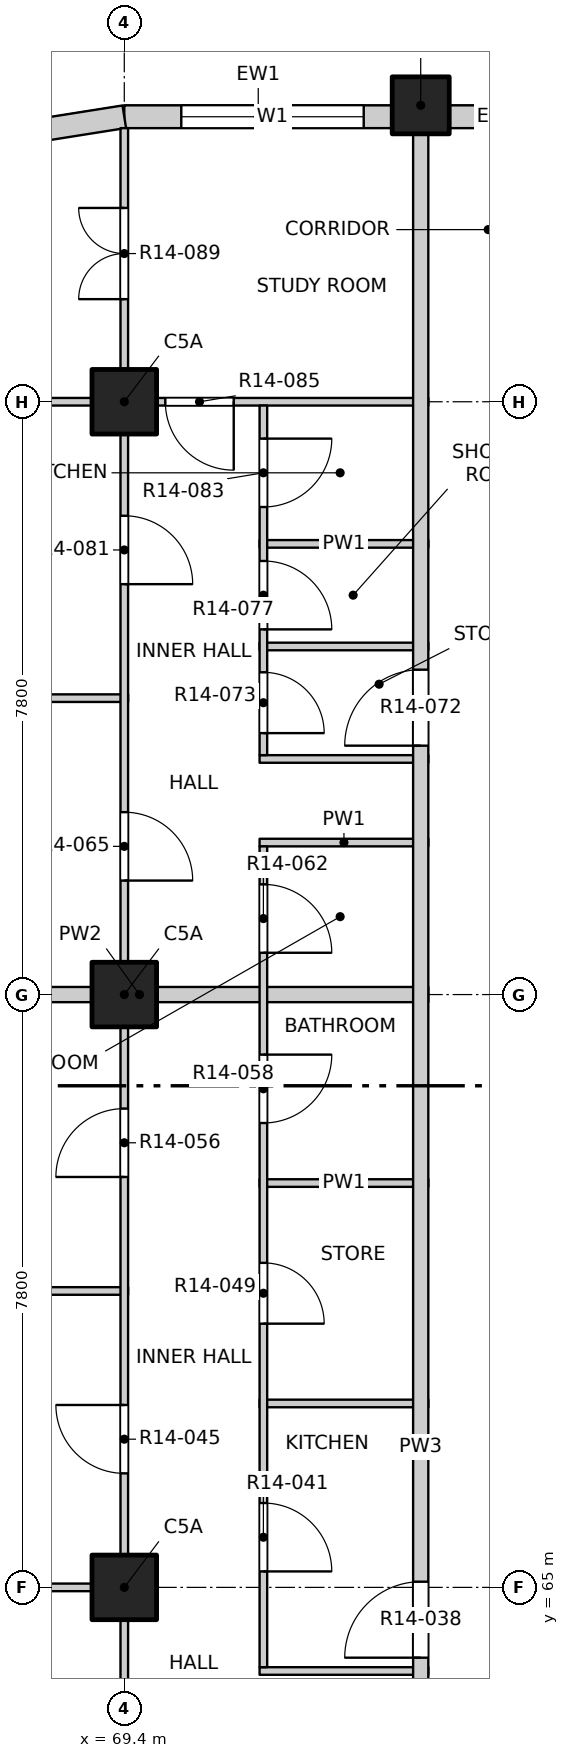
"""IFC4 building model, lengths in metres.
Left out: names, types, materials, properties, quantities, classifications, styles, units other than length and angle.
Written with IfcOpenShell. Run it as: python <this file> out.ifc"""

import sys

from ifc_helpers import new_model, si_unit, direction, frame, frame_2d, origin, origin_2d, place, context, subcontext, project, spatial, rectangle, extrude, element, fill, save


model = new_model("IFC4")
c1 = context("Model", 3, precision=1e-05, world=origin(), true_north=direction((0.0, 1.0)))
c2 = subcontext(c1, "Body", "Model", "MODEL_VIEW")
j1 = project(units=[si_unit("LENGTHUNIT", "METRE"), si_unit("PLANEANGLEUNIT", "RADIAN")], contexts=[c1])
p1 = place(None, origin())
s1 = spatial("IfcSite", under=j1, at=p1, CompositionType="ELEMENT")
p2 = place(p1, origin())
s2 = spatial("IfcBuilding", under=s1, at=p2, CompositionType="ELEMENT")
p3 = place(p2, frame((0.0, 0.0, 148.6)))
s3 = spatial("IfcBuildingStorey", under=s2, at=p3, CompositionType="ELEMENT", Elevation=148.6)
p4 = place(p3, frame((73.3, 84.5, -0.3), z_axis=(0.0, 0.0, 1.0), x_axis=(1.0, 0.0, 0.0)))
e1 = element("IfcColumn", 1, at=p4, inside=s3, PredefinedType="COLUMN", context=c2, shape_type="SweptSolid", body=[
    extrude(rectangle(XDim=0.75, YDim=0.75, at=origin_2d()), origin(), (0.0, 0.0, 1.0), 3.45),
])
for number, where, z_axis, x_axis in (
    (2, (69.4, 65.0, -0.3), (0.0, 0.0, 1.0), (1.0, 0.0, 0.0)),
    (3, (69.4, 72.8, -0.3), (0.0, 0.0, 1.0), (1.0, 0.0, 0.0)),
    (4, (69.4, 80.6, -0.3), (0.0, 0.0, 1.0), (1.0, 0.0, 0.0)),
):
    element("IfcColumn", number, at=place(p3, frame(where, z_axis=z_axis, x_axis=x_axis)), inside=s3, PredefinedType="COLUMN", context=c2, shape_type="SweptSolid", body=[
        extrude(rectangle(XDim=0.85, YDim=0.85, at=origin_2d()), origin(), (0.0, 0.0, 1.0), 3.45),
    ])
p5 = place(p3, frame((69.4, 84.35, 0.0), z_axis=(0.0, 0.0, 1.0), x_axis=(1.0, 0.0, 0.0)))
e5 = element("IfcWall", 5, at=p5, inside=s3, PredefinedType="SOLIDWALL", context=c2, shape_type="SweptSolid", body=[
    extrude(rectangle(XDim=3.525, YDim=0.3, at=frame_2d((1.763, 0.0))), origin(), (0.0, 0.0, 1.0), 2.7),
])
p6 = place(p5, frame((0.75, 0.0, 0.9)))
e6 = element("IfcOpeningElement", 6, at=p6, cuts=e5, PredefinedType="OPENING", context=c2, shape_type="SweptSolid", body=[
    extrude(rectangle(XDim=2.4, YDim=1.8, at=frame_2d((1.2, 0.9))), frame((0.0, 0.16, 0.0), z_axis=(0.0, -1.0, 0.0), x_axis=(1.0, 0.0, 0.0)), (0.0, 0.0, 1.0), 0.32),
])
p7 = place(p3, frame((73.675, 84.35, 0.0), z_axis=(0.0, 0.0, 1.0), x_axis=(1.0, 0.0, 0.0)))
e7 = element("IfcWall", 7, at=p7, inside=s3, PredefinedType="SOLIDWALL", context=c2, shape_type="SweptSolid", body=[
    extrude(rectangle(XDim=1.3, YDim=0.3, at=frame_2d((0.65, 0.0))), origin(), (0.0, 0.0, 1.0), 2.7),
])
p8 = place(p3, frame((69.4, 84.35, 0.0), z_axis=(0.0, 0.0, 1.0), x_axis=(-0.987678452879, -0.156496880861, 0.0)))
e8 = element("IfcWall", 8, at=p8, inside=s3, PredefinedType="SOLIDWALL", context=c2, shape_type="SweptSolid", body=[
    extrude(rectangle(XDim=1.173, YDim=0.3, at=frame_2d((0.586, 0.0))), origin(), (0.0, 0.0, 1.0), 2.7),
])
p9 = place(p3, frame((71.18, 63.9, 0.0), z_axis=(0.0, 0.0, 1.0), x_axis=(1.0, 0.0, 0.0)))
e9 = element("IfcWall", 9, at=p9, inside=s3, PredefinedType="PARTITIONING", context=c2, shape_type="SweptSolid", body=[
    extrude(rectangle(XDim=2.22, YDim=0.1, at=frame_2d((1.11, 0.0))), origin(), (0.0, 0.0, 1.0), 3.15),
])
p10 = place(p3, frame((65.8, 65.0, 0.0), z_axis=(0.0, 0.0, 1.0), x_axis=(1.0, 0.0, 0.0)))
e10 = element("IfcWall", 10, at=p10, inside=s3, PredefinedType="PARTITIONING", context=c2, shape_type="SweptSolid", body=[
    extrude(rectangle(XDim=3.65, YDim=0.1, at=frame_2d((1.825, 0.0))), origin(), (0.0, 0.0, 1.0), 3.15),
])
p11 = place(p3, frame((71.18, 67.42, 0.0), z_axis=(0.0, 0.0, 1.0), x_axis=(1.0, 0.0, 0.0)))
e11 = element("IfcWall", 11, at=p11, inside=s3, PredefinedType="PARTITIONING", context=c2, shape_type="SweptSolid", body=[
    extrude(rectangle(XDim=2.22, YDim=0.1, at=frame_2d((1.11, 0.0))), origin(), (0.0, 0.0, 1.0), 3.15),
])
p12 = place(p3, frame((65.8, 68.9, 0.0), z_axis=(0.0, 0.0, 1.0), x_axis=(1.0, 0.0, 0.0)))
e12 = element("IfcWall", 12, at=p12, inside=s3, PredefinedType="PARTITIONING", context=c2, shape_type="SweptSolid", body=[
    extrude(rectangle(XDim=3.65, YDim=0.1, at=frame_2d((1.825, 0.0))), origin(), (0.0, 0.0, 1.0), 2.55),
])
p13 = place(p3, frame((71.18, 70.32, 0.0), z_axis=(0.0, 0.0, 1.0), x_axis=(1.0, 0.0, 0.0)))
e13 = element("IfcWall", 13, at=p13, inside=s3, PredefinedType="PARTITIONING", context=c2, shape_type="SweptSolid", body=[
    extrude(rectangle(XDim=2.22, YDim=0.1, at=frame_2d((1.11, 0.0))), origin(), (0.0, 0.0, 1.0), 3.15),
])
p14 = place(p3, frame((65.8, 72.8, 0.0), z_axis=(0.0, 0.0, 1.0), x_axis=(1.0, 0.0, 0.0)))
e14 = element("IfcWall", 14, at=p14, inside=s3, PredefinedType="PARTITIONING", context=c2, shape_type="SweptSolid", body=[
    extrude(rectangle(XDim=7.6, YDim=0.2, at=frame_2d((3.8, 0.0))), origin(), (0.0, 0.0, 1.0), 3.15),
])
for number, where, z_axis, x_axis in (
    (15, (71.18, 74.8, 0.0), (0.0, 0.0, 1.0), (1.0, 0.0, 0.0)),
    (16, (71.18, 75.9, 0.0), (0.0, 0.0, 1.0), (1.0, 0.0, 0.0)),
):
    element("IfcWall", number, at=place(p3, frame(where, z_axis=z_axis, x_axis=x_axis)), inside=s3, PredefinedType="PARTITIONING", context=c2, shape_type="SweptSolid", body=[
        extrude(rectangle(XDim=2.22, YDim=0.1, at=frame_2d((1.11, 0.0))), origin(), (0.0, 0.0, 1.0), 3.15),
    ])
p15 = place(p3, frame((65.8, 76.7, 0.0), z_axis=(0.0, 0.0, 1.0), x_axis=(1.0, 0.0, 0.0)))
e17 = element("IfcWall", 17, at=p15, inside=s3, PredefinedType="PARTITIONING", context=c2, shape_type="SweptSolid", body=[
    extrude(rectangle(XDim=3.65, YDim=0.1, at=frame_2d((1.825, 0.0))), origin(), (0.0, 0.0, 1.0), 2.55),
])
for number, where, z_axis, x_axis in (
    (18, (71.18, 77.38, 0.0), (0.0, 0.0, 1.0), (1.0, 0.0, 0.0)),
    (19, (71.18, 78.73, 0.0), (0.0, 0.0, 1.0), (1.0, 0.0, 0.0)),
):
    element("IfcWall", number, at=place(p3, frame(where, z_axis=z_axis, x_axis=x_axis)), inside=s3, PredefinedType="PARTITIONING", context=c2, shape_type="SweptSolid", body=[
        extrude(rectangle(XDim=2.22, YDim=0.1, at=frame_2d((1.11, 0.0))), origin(), (0.0, 0.0, 1.0), 3.15),
    ])
p16 = place(p3, frame((65.8, 80.6, 0.0), z_axis=(0.0, 0.0, 1.0), x_axis=(1.0, 0.0, 0.0)))
e20 = element("IfcWall", 20, at=p16, inside=s3, PredefinedType="PARTITIONING", context=c2, shape_type="SweptSolid", body=[
    extrude(rectangle(XDim=7.6, YDim=0.1, at=frame_2d((3.8, 0.0))), origin(), (0.0, 0.0, 1.0), 3.15),
])
p17 = place(p16, frame((4.14, 0.0, 0.0)))
e21 = element("IfcOpeningElement", 21, at=p17, cuts=e20, PredefinedType="OPENING", context=c2, shape_type="SweptSolid", body=[
    extrude(rectangle(XDim=0.9, YDim=2.1, at=frame_2d((0.45, 1.05))), frame((0.0, 0.06, 0.0), z_axis=(0.0, -1.0, 0.0), x_axis=(1.0, 0.0, 0.0)), (0.0, 0.0, 1.0), 0.12),
])
p18 = place(p3, frame((69.4, 45.8, 0.0), z_axis=(0.0, 0.0, 1.0), x_axis=(0.0, 1.0, 0.0)))
e22 = element("IfcWall", 22, at=p18, inside=s3, PredefinedType="PARTITIONING", context=c2, shape_type="SweptSolid", body=[
    extrude(rectangle(XDim=38.4, YDim=0.1, at=frame_2d((19.2, 0.0))), origin(), (0.0, 0.0, 1.0), 3.15),
])
p19 = place(p18, frame((1.05, 0.0, 0.0)))
e23 = element("IfcOpeningElement", 23, at=p19, cuts=e22, PredefinedType="OPENING", context=c2, shape_type="SweptSolid", body=[
    extrude(rectangle(XDim=1.2, YDim=2.1, at=frame_2d((0.6, 1.05))), frame((0.0, 0.06, 0.0), z_axis=(0.0, -1.0, 0.0), x_axis=(1.0, 0.0, 0.0)), (0.0, 0.0, 1.0), 0.12),
])
p20 = place(p18, frame((6.9, 0.0, 0.0)))
e24 = element("IfcOpeningElement", 24, at=p20, cuts=e22, PredefinedType="OPENING", context=c2, shape_type="SweptSolid", body=[
    extrude(rectangle(XDim=1.2, YDim=2.1, at=frame_2d((0.6, 1.05))), frame((0.0, 0.06, 0.0), z_axis=(0.0, -1.0, 0.0), x_axis=(1.0, 0.0, 0.0)), (0.0, 0.0, 1.0), 0.12),
])
p21 = place(p18, frame((12.9, 0.0, 0.0)))
e25 = element("IfcOpeningElement", 25, at=p21, cuts=e22, PredefinedType="OPENING", context=c2, shape_type="SweptSolid", body=[
    extrude(rectangle(XDim=0.9, YDim=2.1, at=frame_2d((0.45, 1.05))), frame((0.0, 0.06, 0.0), z_axis=(0.0, -1.0, 0.0), x_axis=(1.0, 0.0, 0.0)), (0.0, 0.0, 1.0), 0.12),
])
p22 = place(p18, frame((16.8, 0.0, 0.0)))
e26 = element("IfcOpeningElement", 26, at=p22, cuts=e22, PredefinedType="OPENING", context=c2, shape_type="SweptSolid", body=[
    extrude(rectangle(XDim=0.9, YDim=2.1, at=frame_2d((0.45, 1.05))), frame((0.0, 0.06, 0.0), z_axis=(0.0, -1.0, 0.0), x_axis=(1.0, 0.0, 0.0)), (0.0, 0.0, 1.0), 0.12),
])
p23 = place(p18, frame((20.7, 0.0, 0.0)))
e27 = element("IfcOpeningElement", 27, at=p23, cuts=e22, PredefinedType="OPENING", context=c2, shape_type="SweptSolid", body=[
    extrude(rectangle(XDim=0.9, YDim=2.1, at=frame_2d((0.45, 1.05))), frame((0.0, 0.06, 0.0), z_axis=(0.0, -1.0, 0.0), x_axis=(1.0, 0.0, 0.0)), (0.0, 0.0, 1.0), 0.12),
])
p24 = place(p18, frame((24.6, 0.0, 0.0)))
e28 = element("IfcOpeningElement", 28, at=p24, cuts=e22, PredefinedType="OPENING", context=c2, shape_type="SweptSolid", body=[
    extrude(rectangle(XDim=0.9, YDim=2.1, at=frame_2d((0.45, 1.05))), frame((0.0, 0.06, 0.0), z_axis=(0.0, -1.0, 0.0), x_axis=(1.0, 0.0, 0.0)), (0.0, 0.0, 1.0), 0.12),
])
p25 = place(p18, frame((28.5, 0.0, 0.0)))
e29 = element("IfcOpeningElement", 29, at=p25, cuts=e22, PredefinedType="OPENING", context=c2, shape_type="SweptSolid", body=[
    extrude(rectangle(XDim=0.9, YDim=2.1, at=frame_2d((0.45, 1.05))), frame((0.0, 0.06, 0.0), z_axis=(0.0, -1.0, 0.0), x_axis=(1.0, 0.0, 0.0)), (0.0, 0.0, 1.0), 0.12),
])
p26 = place(p18, frame((32.4, 0.0, 0.0)))
e30 = element("IfcOpeningElement", 30, at=p26, cuts=e22, PredefinedType="OPENING", context=c2, shape_type="SweptSolid", body=[
    extrude(rectangle(XDim=0.9, YDim=2.1, at=frame_2d((0.45, 1.05))), frame((0.0, 0.06, 0.0), z_axis=(0.0, -1.0, 0.0), x_axis=(1.0, 0.0, 0.0)), (0.0, 0.0, 1.0), 0.12),
])
p27 = place(p18, frame((36.15, 0.0, 0.0)))
e31 = element("IfcOpeningElement", 31, at=p27, cuts=e22, PredefinedType="OPENING", context=c2, shape_type="SweptSolid", body=[
    extrude(rectangle(XDim=1.2, YDim=2.1, at=frame_2d((0.6, 1.05))), frame((0.0, 0.06, 0.0), z_axis=(0.0, -1.0, 0.0), x_axis=(1.0, 0.0, 0.0)), (0.0, 0.0, 1.0), 0.12),
])
p28 = place(p3, frame((71.23, 63.95, 0.0), z_axis=(0.0, 0.0, 1.0), x_axis=(0.0, 1.0, 0.0)))
e32 = element("IfcWall", 32, at=p28, inside=s3, PredefinedType="PARTITIONING", context=c2, shape_type="SweptSolid", body=[
    extrude(rectangle(XDim=10.8, YDim=0.1, at=frame_2d((5.4, 0.0))), origin(), (0.0, 0.0, 1.0), 3.15),
])
p29 = place(p28, frame((1.26, 0.0, 0.0)))
e33 = element("IfcOpeningElement", 33, at=p29, cuts=e32, PredefinedType="OPENING", context=c2, shape_type="SweptSolid", body=[
    extrude(rectangle(XDim=0.9, YDim=2.1, at=frame_2d((0.45, 1.05))), frame((0.0, 0.06, 0.0), z_axis=(0.0, -1.0, 0.0), x_axis=(1.0, 0.0, 0.0)), (0.0, 0.0, 1.0), 0.12),
])
p30 = place(p28, frame((4.52, 0.0, 0.0)))
e34 = element("IfcOpeningElement", 34, at=p30, cuts=e32, PredefinedType="OPENING", context=c2, shape_type="SweptSolid", body=[
    extrude(rectangle(XDim=0.8, YDim=2.1, at=frame_2d((0.4, 1.05))), frame((0.0, 0.06, 0.0), z_axis=(0.0, -1.0, 0.0), x_axis=(1.0, 0.0, 0.0)), (0.0, 0.0, 1.0), 0.12),
])
p31 = place(p28, frame((7.16, 0.0, 0.0)))
e35 = element("IfcOpeningElement", 35, at=p31, cuts=e32, PredefinedType="OPENING", context=c2, shape_type="SweptSolid", body=[
    extrude(rectangle(XDim=0.9, YDim=2.1, at=frame_2d((0.45, 1.05))), frame((0.0, 0.06, 0.0), z_axis=(0.0, -1.0, 0.0), x_axis=(1.0, 0.0, 0.0)), (0.0, 0.0, 1.0), 0.12),
])
p32 = place(p28, frame((9.4, 0.0, 0.0)))
e36 = element("IfcOpeningElement", 36, at=p32, cuts=e32, PredefinedType="OPENING", context=c2, shape_type="SweptSolid", body=[
    extrude(rectangle(XDim=0.9, YDim=2.1, at=frame_2d((0.45, 1.05))), frame((0.0, 0.06, 0.0), z_axis=(0.0, -1.0, 0.0), x_axis=(1.0, 0.0, 0.0)), (0.0, 0.0, 1.0), 0.12),
])
p33 = place(p3, frame((71.23, 75.95, 0.0), z_axis=(0.0, 0.0, 1.0), x_axis=(0.0, 1.0, 0.0)))
e37 = element("IfcWall", 37, at=p33, inside=s3, PredefinedType="PARTITIONING", context=c2, shape_type="SweptSolid", body=[
    extrude(rectangle(XDim=4.6, YDim=0.1, at=frame_2d((2.3, 0.0))), origin(), (0.0, 0.0, 1.0), 3.15),
])
p34 = place(p33, frame((0.29, 0.0, 0.0)))
e38 = element("IfcOpeningElement", 38, at=p34, cuts=e37, PredefinedType="OPENING", context=c2, shape_type="SweptSolid", body=[
    extrude(rectangle(XDim=0.8, YDim=2.1, at=frame_2d((0.4, 1.05))), frame((0.0, 0.06, 0.0), z_axis=(0.0, -1.0, 0.0), x_axis=(1.0, 0.0, 0.0)), (0.0, 0.0, 1.0), 0.12),
])
p35 = place(p33, frame((1.655, 0.0, 0.0)))
e39 = element("IfcOpeningElement", 39, at=p35, cuts=e37, PredefinedType="OPENING", context=c2, shape_type="SweptSolid", body=[
    extrude(rectangle(XDim=0.9, YDim=2.1, at=frame_2d((0.45, 1.05))), frame((0.0, 0.06, 0.0), z_axis=(0.0, -1.0, 0.0), x_axis=(1.0, 0.0, 0.0)), (0.0, 0.0, 1.0), 0.12),
])
p36 = place(p33, frame((3.265, 0.0, 0.0)))
e40 = element("IfcOpeningElement", 40, at=p36, cuts=e37, PredefinedType="OPENING", context=c2, shape_type="SweptSolid", body=[
    extrude(rectangle(XDim=0.9, YDim=2.1, at=frame_2d((0.45, 1.05))), frame((0.0, 0.06, 0.0), z_axis=(0.0, -1.0, 0.0), x_axis=(1.0, 0.0, 0.0)), (0.0, 0.0, 1.0), 0.12),
])
p37 = place(p3, frame((73.3, 49.5, 0.0), z_axis=(0.0, 0.0, 1.0), x_axis=(0.0, 1.0, 0.0)))
e41 = element("IfcWall", 41, at=p37, inside=s3, PredefinedType="PARTITIONING", context=c2, shape_type="SweptSolid", body=[
    extrude(rectangle(XDim=34.7, YDim=0.2, at=frame_2d((17.35, 0.0))), origin(), (0.0, 0.0, 1.0), 3.15),
])
p38 = place(p37, frame((10.125, 0.0, 0.0)))
e42 = element("IfcOpeningElement", 42, at=p38, cuts=e41, PredefinedType="OPENING", context=c2, shape_type="SweptSolid", body=[
    extrude(rectangle(XDim=1.0, YDim=2.1, at=frame_2d((0.5, 1.05))), frame((0.0, 0.11, 0.0), z_axis=(0.0, -1.0, 0.0), x_axis=(1.0, 0.0, 0.0)), (0.0, 0.0, 1.0), 0.22),
])
p39 = place(p37, frame((14.575, 0.0, 0.0)))
e43 = element("IfcOpeningElement", 43, at=p39, cuts=e41, PredefinedType="OPENING", context=c2, shape_type="SweptSolid", body=[
    extrude(rectangle(XDim=1.0, YDim=2.1, at=frame_2d((0.5, 1.05))), frame((0.0, 0.11, 0.0), z_axis=(0.0, -1.0, 0.0), x_axis=(1.0, 0.0, 0.0)), (0.0, 0.0, 1.0), 0.22),
])
p40 = place(p37, frame((26.575, 0.0, 0.0)))
e44 = element("IfcOpeningElement", 44, at=p40, cuts=e41, PredefinedType="OPENING", context=c2, shape_type="SweptSolid", body=[
    extrude(rectangle(XDim=1.0, YDim=2.1, at=frame_2d((0.5, 1.05))), frame((0.0, 0.11, 0.0), z_axis=(0.0, -1.0, 0.0), x_axis=(1.0, 0.0, 0.0)), (0.0, 0.0, 1.0), 0.22),
])
p41 = place(p6, origin())
e45 = element("IfcWindow", 45, at=p41, inside=s3, PartitioningType="DOUBLE_PANEL_VERTICAL", PredefinedType="WINDOW", context=c2, shape_type="SweptSolid", body=[
    extrude(rectangle(XDim=2.4, YDim=1.8, at=frame_2d((1.2, 0.9))), frame((0.0, 0.03, 0.0), z_axis=(0.0, -1.0, 0.0), x_axis=(1.0, 0.0, 0.0)), (0.0, 0.0, 1.0), 0.06),
])
fill(e6, e45)
p42 = place(p39, origin())
e46 = element("IfcDoor", 46, at=p42, inside=s3, OperationType="SINGLE_SWING_RIGHT", PredefinedType="DOOR", context=c2, shape_type="SweptSolid", body=[
    extrude(rectangle(XDim=1.0, YDim=2.1, at=frame_2d((0.5, 1.05))), frame((0.0, 0.025, 0.0), z_axis=(0.0, -1.0, 0.0), x_axis=(1.0, 0.0, 0.0)), (0.0, 0.0, 1.0), 0.05),
])
fill(e43, e46)
p43 = place(p29, origin())
e47 = element("IfcDoor", 47, at=p43, inside=s3, OperationType="SINGLE_SWING_RIGHT", PredefinedType="DOOR", context=c2, shape_type="SweptSolid", body=[
    extrude(rectangle(XDim=0.9, YDim=2.1, at=frame_2d((0.45, 1.05))), frame((0.0, 0.025, 0.0), z_axis=(0.0, -1.0, 0.0), x_axis=(1.0, 0.0, 0.0)), (0.0, 0.0, 1.0), 0.05),
])
fill(e33, e47)
p44 = place(p23, origin())
e48 = element("IfcDoor", 48, at=p44, inside=s3, OperationType="SINGLE_SWING_RIGHT", PredefinedType="DOOR", context=c2, shape_type="SweptSolid", body=[
    extrude(rectangle(XDim=0.9, YDim=2.1, at=frame_2d((0.45, 1.05))), frame((0.0, 0.025, 0.0), z_axis=(0.0, -1.0, 0.0), x_axis=(1.0, 0.0, 0.0)), (0.0, 0.0, 1.0), 0.05),
])
fill(e27, e48)
p45 = place(p30, origin())
e49 = element("IfcDoor", 49, at=p45, inside=s3, OperationType="SINGLE_SWING_RIGHT", PredefinedType="DOOR", context=c2, shape_type="SweptSolid", body=[
    extrude(rectangle(XDim=0.8, YDim=2.1, at=frame_2d((0.4, 1.05))), frame((0.0, 0.025, 0.0), z_axis=(0.0, -1.0, 0.0), x_axis=(1.0, 0.0, 0.0)), (0.0, 0.0, 1.0), 0.05),
])
fill(e34, e49)
p46 = place(p24, origin())
e50 = element("IfcDoor", 50, at=p46, inside=s3, OperationType="SINGLE_SWING_LEFT", PredefinedType="DOOR", context=c2, shape_type="SweptSolid", body=[
    extrude(rectangle(XDim=0.9, YDim=2.1, at=frame_2d((0.45, 1.05))), frame((0.0, 0.025, 0.0), z_axis=(0.0, -1.0, 0.0), x_axis=(1.0, 0.0, 0.0)), (0.0, 0.0, 1.0), 0.05),
])
fill(e28, e50)
p47 = place(p31, origin())
e51 = element("IfcDoor", 51, at=p47, inside=s3, OperationType="SINGLE_SWING_LEFT", PredefinedType="DOOR", context=c2, shape_type="SweptSolid", body=[
    extrude(rectangle(XDim=0.9, YDim=2.1, at=frame_2d((0.45, 1.05))), frame((0.0, 0.025, 0.0), z_axis=(0.0, -1.0, 0.0), x_axis=(1.0, 0.0, 0.0)), (0.0, 0.0, 1.0), 0.05),
])
fill(e35, e51)
p48 = place(p32, origin())
e52 = element("IfcDoor", 52, at=p48, inside=s3, OperationType="SINGLE_SWING_RIGHT", PredefinedType="DOOR", context=c2, shape_type="SweptSolid", body=[
    extrude(rectangle(XDim=0.9, YDim=2.1, at=frame_2d((0.45, 1.05))), frame((0.0, 0.025, 0.0), z_axis=(0.0, -1.0, 0.0), x_axis=(1.0, 0.0, 0.0)), (0.0, 0.0, 1.0), 0.05),
])
fill(e36, e52)
p49 = place(p25, origin())
e53 = element("IfcDoor", 53, at=p49, inside=s3, OperationType="SINGLE_SWING_RIGHT", PredefinedType="DOOR", context=c2, shape_type="SweptSolid", body=[
    extrude(rectangle(XDim=0.9, YDim=2.1, at=frame_2d((0.45, 1.05))), frame((0.0, 0.025, 0.0), z_axis=(0.0, -1.0, 0.0), x_axis=(1.0, 0.0, 0.0)), (0.0, 0.0, 1.0), 0.05),
])
fill(e29, e53)
p50 = place(p40, origin())
e54 = element("IfcDoor", 54, at=p50, inside=s3, OperationType="SINGLE_SWING_RIGHT", PredefinedType="DOOR", context=c2, shape_type="SweptSolid", body=[
    extrude(rectangle(XDim=1.0, YDim=2.1, at=frame_2d((0.5, 1.05))), frame((0.0, 0.025, 0.0), z_axis=(0.0, -1.0, 0.0), x_axis=(1.0, 0.0, 0.0)), (0.0, 0.0, 1.0), 0.05),
])
fill(e44, e54)
p51 = place(p34, origin())
e55 = element("IfcDoor", 55, at=p51, inside=s3, OperationType="SINGLE_SWING_RIGHT", PredefinedType="DOOR", context=c2, shape_type="SweptSolid", body=[
    extrude(rectangle(XDim=0.8, YDim=2.1, at=frame_2d((0.4, 1.05))), frame((0.0, 0.025, 0.0), z_axis=(0.0, -1.0, 0.0), x_axis=(1.0, 0.0, 0.0)), (0.0, 0.0, 1.0), 0.05),
])
fill(e38, e55)
p52 = place(p35, origin())
e56 = element("IfcDoor", 56, at=p52, inside=s3, OperationType="SINGLE_SWING_RIGHT", PredefinedType="DOOR", context=c2, shape_type="SweptSolid", body=[
    extrude(rectangle(XDim=0.9, YDim=2.1, at=frame_2d((0.45, 1.05))), frame((0.0, 0.025, 0.0), z_axis=(0.0, -1.0, 0.0), x_axis=(1.0, 0.0, 0.0)), (0.0, 0.0, 1.0), 0.05),
])
fill(e39, e56)
p53 = place(p26, origin())
e57 = element("IfcDoor", 57, at=p53, inside=s3, OperationType="SINGLE_SWING_RIGHT", PredefinedType="DOOR", context=c2, shape_type="SweptSolid", body=[
    extrude(rectangle(XDim=0.9, YDim=2.1, at=frame_2d((0.45, 1.05))), frame((0.0, 0.025, 0.0), z_axis=(0.0, -1.0, 0.0), x_axis=(1.0, 0.0, 0.0)), (0.0, 0.0, 1.0), 0.05),
])
fill(e30, e57)
p54 = place(p36, origin())
e58 = element("IfcDoor", 58, at=p54, inside=s3, OperationType="SINGLE_SWING_LEFT", PredefinedType="DOOR", context=c2, shape_type="SweptSolid", body=[
    extrude(rectangle(XDim=0.9, YDim=2.1, at=frame_2d((0.45, 1.05))), frame((0.0, 0.025, 0.0), z_axis=(0.0, -1.0, 0.0), x_axis=(1.0, 0.0, 0.0)), (0.0, 0.0, 1.0), 0.05),
])
fill(e40, e58)
p55 = place(p17, origin())
e59 = element("IfcDoor", 59, at=p55, inside=s3, OperationType="SINGLE_SWING_LEFT", PredefinedType="DOOR", context=c2, shape_type="SweptSolid", body=[
    extrude(rectangle(XDim=0.9, YDim=2.1, at=frame_2d((0.45, 1.05))), frame((0.0, 0.025, 0.0), z_axis=(0.0, -1.0, 0.0), x_axis=(1.0, 0.0, 0.0)), (0.0, 0.0, 1.0), 0.05),
])
fill(e21, e59)
p56 = place(p27, origin())
e60 = element("IfcDoor", 60, at=p56, inside=s3, OperationType="DOUBLE_DOOR_SINGLE_SWING", PredefinedType="DOOR", context=c2, shape_type="SweptSolid", body=[
    extrude(rectangle(XDim=1.2, YDim=2.1, at=frame_2d((0.6, 1.05))), frame((0.0, 0.025, 0.0), z_axis=(0.0, -1.0, 0.0), x_axis=(1.0, 0.0, 0.0)), (0.0, 0.0, 1.0), 0.05),
])
fill(e31, e60)
save(model, sys.argv[1])
